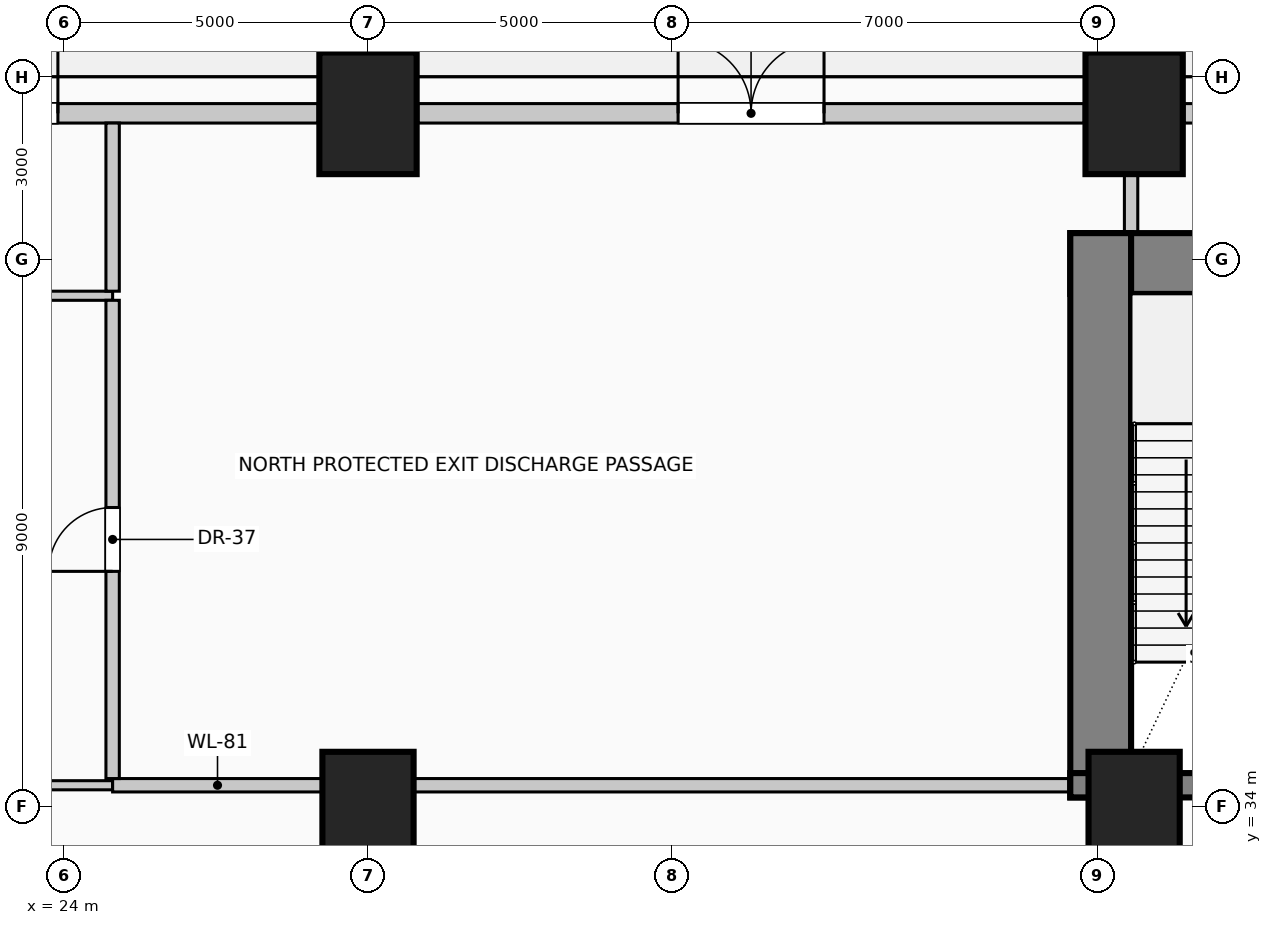
"""IFC4 building model, lengths in metres.
Left out: names, types, materials, properties, quantities, classifications, styles, units other than length and angle.
Written with IfcOpenShell. Run it as: python <this file> out.ifc"""

import sys

from ifc_helpers import new_model, si_unit, direction, frame, frame_2d, origin, origin_2d, place, context, subcontext, project, spatial, rectangle, extrude, element, fill, save


model = new_model("IFC4")
c1 = context("Model", 3, precision=1e-05, world=origin(), true_north=direction((0.0, 1.0)))
c2 = subcontext(c1, "Body", "Model", "MODEL_VIEW")
j1 = project(units=[si_unit("LENGTHUNIT", "METRE"), si_unit("PLANEANGLEUNIT", "RADIAN")], contexts=[c1])
p1 = place(None, origin())
s1 = spatial("IfcSite", under=j1, at=p1, CompositionType="ELEMENT")
p2 = place(p1, origin())
s2 = spatial("IfcBuilding", under=s1, at=p2, CompositionType="ELEMENT")
p3 = place(p2, origin())
s3 = spatial("IfcBuildingStorey", under=s2, at=p3, CompositionType="ELEMENT", Elevation=0.0)
p4 = place(p3, frame((40.55, 42.93, 0.0), z_axis=(0.0, 0.0, 1.0), x_axis=(1.0, 0.0, 0.0)))
e1 = element("IfcWall", 1, at=p4, inside=s3, PredefinedType="SHEAR", context=c2, shape_type="SweptSolid", body=[
    extrude(rectangle(XDim=14.9, YDim=1.0, at=frame_2d((7.45, 0.0))), origin(), (0.0, 0.0, 1.0), 5.4),
])
p5 = place(p3, frame((41.05, 34.15, 0.0), z_axis=(0.0, 0.0, 1.0), x_axis=(0.0, 1.0, 0.0)))
e2 = element("IfcWall", 2, at=p5, inside=s3, PredefinedType="SHEAR", context=c2, shape_type="SweptSolid", body=[
    extrude(rectangle(XDim=9.28, YDim=1.0, at=frame_2d((4.64, 0.0))), origin(), (0.0, 0.0, 1.0), 5.4),
])
p6 = place(p3, frame((40.55, 34.35, 0.0), z_axis=(0.0, 0.0, 1.0), x_axis=(1.0, 0.0, 0.0)))
e3 = element("IfcWall", 3, at=p6, inside=s3, PredefinedType="SHEAR", context=c2, shape_type="SweptSolid", body=[
    extrude(rectangle(XDim=5.16, YDim=0.4, at=frame_2d((2.58, 0.0))), origin(), (0.0, 0.0, 1.0), 5.4),
])
p7 = place(p6, frame((2.4, 0.0, 0.0)))
e4 = element("IfcOpeningElement", 4, at=p7, cuts=e3, PredefinedType="OPENING", context=c2, shape_type="SweptSolid", body=[
    extrude(rectangle(XDim=1.15, YDim=2.2, at=frame_2d((0.575, 1.1))), frame((0.0, 0.21, 0.0), z_axis=(0.0, -1.0, 0.0), x_axis=(1.0, 0.0, 0.0)), (0.0, 0.0, 1.0), 0.42),
])
for number, where, z_axis, x_axis in (
    (5, (29.0, 45.4, 0.0), (0.0, 0.0, 1.0), (1.0, 0.0, 0.0)),
    (6, (41.6, 45.4, 0.0), (0.0, 0.0, 1.0), (1.0, 0.0, 0.0)),
):
    element("IfcColumn", number, at=place(p3, frame(where, z_axis=z_axis, x_axis=x_axis)), inside=s3, PredefinedType="COLUMN", context=c2, shape_type="SweptSolid", body=[
        extrude(rectangle(XDim=1.6, YDim=2.0, at=origin_2d()), origin(), (0.0, 0.0, 1.0), 5.4),
    ])
for number, where, z_axis, x_axis in (
    (7, (29.0, 34.0, 0.0), (0.0, 0.0, 1.0), (1.0, 0.0, 0.0)),
    (8, (41.6, 34.0, 0.0), (0.0, 0.0, 1.0), (1.0, 0.0, 0.0)),
):
    element("IfcColumn", number, at=place(p3, frame(where, z_axis=z_axis, x_axis=x_axis)), inside=s3, PredefinedType="COLUMN", context=c2, shape_type="SweptSolid", body=[
        extrude(rectangle(XDim=1.5, YDim=1.8, at=origin_2d()), origin(), (0.0, 0.0, 1.0), 5.4),
    ])
p8 = place(p3, frame((17.22, 45.4, 0.0), z_axis=(0.0, 0.0, 1.0), x_axis=(1.0, 0.0, 0.0)))
e9 = element("IfcWall", 9, at=p8, inside=s3, PredefinedType="SOLIDWALL", context=c2, shape_type="SweptSolid", body=[
    extrude(rectangle(XDim=10.96, YDim=0.32, at=frame_2d((5.48, 0.0))), origin(), (0.0, 0.0, 1.0), 4.05),
])
p9 = place(p8, frame((4.28, 0.0, 0.0)))
e10 = element("IfcOpeningElement", 10, at=p9, cuts=e9, PredefinedType="OPENING", context=c2, shape_type="SweptSolid", body=[
    extrude(rectangle(XDim=2.4, YDim=2.6, at=frame_2d((1.2, 1.3))), frame((0.0, 0.17, 0.0), z_axis=(0.0, -1.0, 0.0), x_axis=(1.0, 0.0, 0.0)), (0.0, 0.0, 1.0), 0.34),
])
p10 = place(p3, frame((29.82, 45.4, 0.0), z_axis=(0.0, 0.0, 1.0), x_axis=(1.0, 0.0, 0.0)))
e11 = element("IfcWall", 11, at=p10, inside=s3, PredefinedType="SOLIDWALL", context=c2, shape_type="SweptSolid", body=[
    extrude(rectangle(XDim=10.96, YDim=0.32, at=frame_2d((5.48, 0.0))), origin(), (0.0, 0.0, 1.0), 4.05),
])
p11 = place(p10, frame((4.28, 0.0, 0.0)))
e12 = element("IfcOpeningElement", 12, at=p11, cuts=e11, PredefinedType="OPENING", context=c2, shape_type="SweptSolid", body=[
    extrude(rectangle(XDim=2.4, YDim=2.6, at=frame_2d((1.2, 1.3))), frame((0.0, 0.17, 0.0), z_axis=(0.0, -1.0, 0.0), x_axis=(1.0, 0.0, 0.0)), (0.0, 0.0, 1.0), 0.34),
])
p12 = place(p3, frame((42.42, 45.4, 0.0), z_axis=(0.0, 0.0, 1.0), x_axis=(1.0, 0.0, 0.0)))
e13 = element("IfcWall", 13, at=p12, inside=s3, PredefinedType="SOLIDWALL", context=c2, shape_type="SweptSolid", body=[
    extrude(rectangle(XDim=11.16, YDim=0.32, at=frame_2d((5.58, 0.0))), origin(), (0.0, 0.0, 1.0), 4.05),
])
p13 = place(p3, frame((17.45, 34.35, 0.0), z_axis=(0.0, 0.0, 1.0), x_axis=(1.0, 0.0, 0.0)))
e14 = element("IfcWall", 14, at=p13, inside=s3, PredefinedType="PARTITIONING", context=c2, shape_type="SweptSolid", body=[
    extrude(rectangle(XDim=7.35, YDim=0.15, at=frame_2d((3.675, 0.0))), origin(), (0.0, 0.0, 1.0), 4.045),
])
p14 = place(p3, frame((24.8, 34.35, 0.0), z_axis=(0.0, 0.0, 1.0), x_axis=(1.0, 0.0, 0.0)))
e15 = element("IfcWall", 15, at=p14, inside=s3, PredefinedType="PARTITIONING", context=c2, shape_type="SweptSolid", body=[
    extrude(rectangle(XDim=3.45, YDim=0.22, at=frame_2d((1.725, 0.0))), origin(), (0.0, 0.0, 1.0), 4.045),
])
p15 = place(p3, frame((29.75, 34.35, 0.0), z_axis=(0.0, 0.0, 1.0), x_axis=(1.0, 0.0, 0.0)))
e16 = element("IfcWall", 16, at=p15, inside=s3, PredefinedType="PARTITIONING", context=c2, shape_type="SweptSolid", body=[
    extrude(rectangle(XDim=10.8, YDim=0.22, at=frame_2d((5.4, 0.0))), origin(), (0.0, 0.0, 1.0), 4.045),
])
p16 = place(p3, frame((17.45, 42.4, 0.0), z_axis=(0.0, 0.0, 1.0), x_axis=(1.0, 0.0, 0.0)))
e17 = element("IfcWall", 17, at=p16, inside=s3, PredefinedType="PARTITIONING", context=c2, shape_type="SweptSolid", body=[
    extrude(rectangle(XDim=7.35, YDim=0.15, at=frame_2d((3.675, 0.0))), origin(), (0.0, 0.0, 1.0), 5.0),
])
p17 = place(p3, frame((24.8, 34.46, 0.0), z_axis=(0.0, 0.0, 1.0), x_axis=(0.0, 1.0, 0.0)))
e18 = element("IfcWall", 18, at=p17, inside=s3, PredefinedType="PARTITIONING", context=c2, shape_type="SweptSolid", body=[
    extrude(rectangle(XDim=7.865, YDim=0.22, at=frame_2d((3.933, 0.0))), origin(), (0.0, 0.0, 1.0), 5.0),
])
p18 = place(p17, frame((3.407, 0.0, 0.0)))
e19 = element("IfcOpeningElement", 19, at=p18, cuts=e18, PredefinedType="OPENING", context=c2, shape_type="SweptSolid", body=[
    extrude(rectangle(XDim=1.05, YDim=2.15, at=frame_2d((0.525, 1.075))), frame((0.0, 0.12, 0.0), z_axis=(0.0, -1.0, 0.0), x_axis=(1.0, 0.0, 0.0)), (0.0, 0.0, 1.0), 0.24),
])
p19 = place(p3, frame((24.8, 42.475, 0.0), z_axis=(0.0, 0.0, 1.0), x_axis=(0.0, 1.0, 0.0)))
e20 = element("IfcWall", 20, at=p19, inside=s3, PredefinedType="PARTITIONING", context=c2, shape_type="SweptSolid", body=[
    extrude(rectangle(XDim=2.765, YDim=0.22, at=frame_2d((1.382, 0.0))), origin(), (0.0, 0.0, 1.0), 5.0),
])
p20 = place(p3, frame((41.55, 43.43, 0.0), z_axis=(0.0, 0.0, 1.0), x_axis=(0.0, 1.0, 0.0)))
e21 = element("IfcWall", 21, at=p20, inside=s3, PredefinedType="PARTITIONING", context=c2, shape_type="SweptSolid", body=[
    extrude(rectangle(XDim=0.97, YDim=0.22, at=frame_2d((0.485, 0.0))), origin(), (0.0, 0.0, 1.0), 5.0),
])
p21 = place(p9, origin())
e22 = element("IfcDoor", 22, at=p21, inside=s3, OperationType="DOUBLE_DOOR_SINGLE_SWING", PredefinedType="DOOR", context=c2, shape_type="SweptSolid", body=[
    extrude(rectangle(XDim=2.4, YDim=2.6, at=frame_2d((1.2, 1.3))), frame((0.0, 0.025, 0.0), z_axis=(0.0, -1.0, 0.0), x_axis=(1.0, 0.0, 0.0)), (0.0, 0.0, 1.0), 0.05),
])
fill(e10, e22)
p22 = place(p11, origin())
e23 = element("IfcDoor", 23, at=p22, inside=s3, OperationType="DOUBLE_DOOR_SINGLE_SWING", PredefinedType="DOOR", context=c2, shape_type="SweptSolid", body=[
    extrude(rectangle(XDim=2.4, YDim=2.6, at=frame_2d((1.2, 1.3))), frame((0.0, 0.025, 0.0), z_axis=(0.0, -1.0, 0.0), x_axis=(1.0, 0.0, 0.0)), (0.0, 0.0, 1.0), 0.05),
])
fill(e12, e23)
p23 = place(p18, origin())
e24 = element("IfcDoor", 24, at=p23, inside=s3, OperationType="SINGLE_SWING_LEFT", PredefinedType="DOOR", context=c2, shape_type="SweptSolid", body=[
    extrude(rectangle(XDim=1.05, YDim=2.15, at=frame_2d((0.525, 1.075))), frame((0.0, 0.025, 0.0), z_axis=(0.0, -1.0, 0.0), x_axis=(1.0, 0.0, 0.0)), (0.0, 0.0, 1.0), 0.05),
])
fill(e19, e24)
save(model, sys.argv[1])
